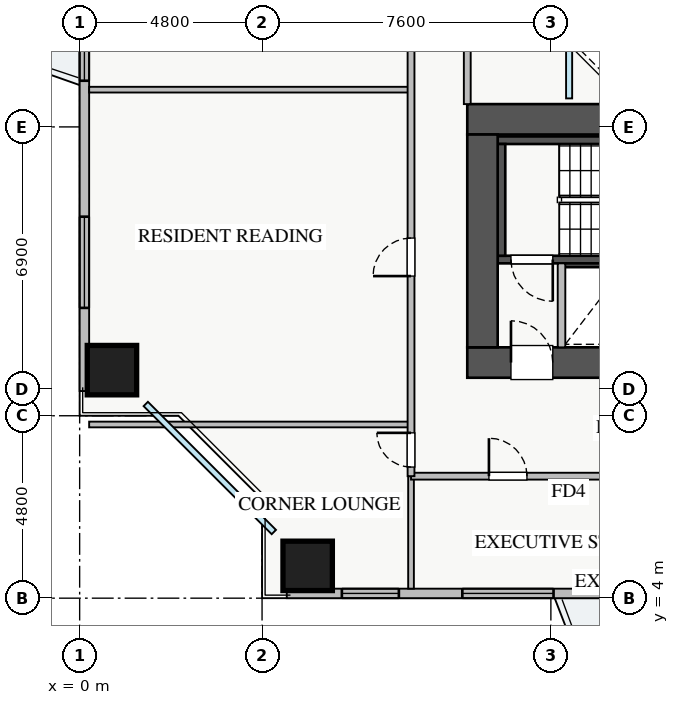
"""IFC4 building model, lengths in metres.
Left out: names, types, materials, properties, quantities, classifications, styles, units other than length and angle.
Written with IfcOpenShell. Run it as: python <this file> out.ifc"""

import sys

from ifc_helpers import new_model, si_unit, direction, frame, frame_2d, origin, origin_2d, place, context, subcontext, project, spatial, rectangle, extrude, source, transform, mapped, element, fill, save


model = new_model("IFC4")
c1 = context("Model", 3, precision=1e-05, world=origin(), true_north=direction((0.0, 1.0)))
c2 = subcontext(c1, "Body", "Model", "MODEL_VIEW")
j1 = project(units=[si_unit("LENGTHUNIT", "METRE"), si_unit("PLANEANGLEUNIT", "RADIAN")], contexts=[c1])
p1 = place(None, origin())
s1 = spatial("IfcSite", under=j1, at=p1, CompositionType="ELEMENT")
p2 = place(p1, origin())
s2 = spatial("IfcBuilding", under=s1, at=p2, CompositionType="ELEMENT")
p3 = place(p2, frame((0.0, 0.0, 42.5)))
s3 = spatial("IfcBuildingStorey", under=s2, at=p3, CompositionType="ELEMENT", Elevation=42.5)
p4 = place(p3, frame((12.68, 12.8, 0.0), z_axis=(0.0, 0.0, 1.0), x_axis=(1.0, 0.0, 0.0)))
e1 = element("IfcWall", 1, at=p4, inside=s3, PredefinedType="SHEAR", context=c2, shape_type="SweptSolid", body=[
    extrude(rectangle(XDim=1.94, YDim=0.18, at=frame_2d((0.97, 0.0))), origin(), (0.0, 0.0, 1.0), 3.03),
])
p5 = place(p3, frame((11.0, 12.91, 0.0), z_axis=(0.0, 0.0, 1.0), x_axis=(1.0, 0.0, 0.0)))
e2 = element("IfcWall", 2, at=p5, inside=s3, PredefinedType="SHEAR", context=c2, shape_type="SweptSolid", body=[
    extrude(rectangle(XDim=7.15, YDim=0.2, at=frame_2d((3.575, 0.0))), origin(), (0.0, 0.0, 1.0), 3.25),
])
p6 = place(p5, frame((0.35, 0.0, 0.0)))
e3 = element("IfcOpeningElement", 3, at=p6, cuts=e2, PredefinedType="OPENING", context=c2, shape_type="SweptSolid", body=[
    extrude(rectangle(XDim=1.1, YDim=2.05, at=frame_2d((0.55, 1.025))), frame((0.0, 0.11, 0.0), z_axis=(0.0, -1.0, 0.0), x_axis=(1.0, 0.0, 0.0)), (0.0, 0.0, 1.0), 0.22),
])
p7 = place(p3, frame((11.0, 16.05, 0.0), z_axis=(0.0, 0.0, 1.0), x_axis=(1.0, 0.0, 0.0)))
e4 = element("IfcWall", 4, at=p7, inside=s3, PredefinedType="SHEAR", context=c2, shape_type="SweptSolid", body=[
    extrude(rectangle(XDim=7.15, YDim=0.2, at=frame_2d((3.575, 0.0))), origin(), (0.0, 0.0, 1.0), 3.25),
])
p8 = place(p3, frame((11.1, 13.01, 0.0), z_axis=(0.0, 0.0, 1.0), x_axis=(0.0, 1.0, 0.0)))
e5 = element("IfcWall", 5, at=p8, inside=s3, PredefinedType="SHEAR", context=c2, shape_type="SweptSolid", body=[
    extrude(rectangle(XDim=2.94, YDim=0.2, at=frame_2d((1.47, 0.0))), origin(), (0.0, 0.0, 1.0), 3.25),
])
p9 = place(p3, frame((10.2, 10.2, 0.0), z_axis=(0.0, 0.0, 1.0), x_axis=(1.0, 0.0, 0.0)))
e6 = element("IfcWall", 6, at=p9, inside=s3, PredefinedType="SHEAR", context=c2, shape_type="SweptSolid", body=[
    extrude(rectangle(XDim=17.6, YDim=0.8, at=frame_2d((8.8, 0.0))), origin(), (0.0, 0.0, 1.0), 3.25),
])
p10 = place(p9, frame((1.15, 0.0, 0.0)))
e7 = element("IfcOpeningElement", 7, at=p10, cuts=e6, PredefinedType="OPENING", context=c2, shape_type="SweptSolid", body=[
    extrude(rectangle(XDim=1.1, YDim=2.05, at=frame_2d((0.55, 1.025))), frame((0.0, 0.41, 0.0), z_axis=(0.0, -1.0, 0.0), x_axis=(1.0, 0.0, 0.0)), (0.0, 0.0, 1.0), 0.82),
])
p11 = place(p9, frame((8.3, 0.0, 0.0)))
e8 = element("IfcOpeningElement", 8, at=p11, cuts=e6, PredefinedType="OPENING", context=c2, shape_type="SweptSolid", body=[
    extrude(rectangle(XDim=1.1, YDim=2.05, at=frame_2d((0.55, 1.025))), frame((0.0, 0.41, 0.0), z_axis=(0.0, -1.0, 0.0), x_axis=(1.0, 0.0, 0.0)), (0.0, 0.0, 1.0), 0.82),
])
p12 = place(p9, frame((10.05, 0.0, 0.0)))
e9 = element("IfcOpeningElement", 9, at=p12, cuts=e6, PredefinedType="OPENING", context=c2, shape_type="SweptSolid", body=[
    extrude(rectangle(XDim=1.1, YDim=2.05, at=frame_2d((0.55, 1.025))), frame((0.0, 0.41, 0.0), z_axis=(0.0, -1.0, 0.0), x_axis=(1.0, 0.0, 0.0)), (0.0, 0.0, 1.0), 0.82),
])
p13 = place(p9, frame((14.74, 0.0, 0.0)))
e10 = element("IfcOpeningElement", 10, at=p13, cuts=e6, PredefinedType="OPENING", context=c2, shape_type="SweptSolid", body=[
    extrude(rectangle(XDim=1.0, YDim=2.05, at=frame_2d((0.5, 1.025))), frame((0.0, 0.41, 0.0), z_axis=(0.0, -1.0, 0.0), x_axis=(1.0, 0.0, 0.0)), (0.0, 0.0, 1.0), 0.82),
])
p14 = place(p9, frame((11.835, 0.0, 0.0)))
e11 = element("IfcOpeningElement", 11, at=p14, cuts=e6, PredefinedType="OPENING", context=c2, shape_type="SweptSolid", body=[
    extrude(rectangle(XDim=1.0, YDim=2.05, at=frame_2d((0.5, 1.025))), frame((0.0, 0.41, 0.0), z_axis=(0.0, -1.0, 0.0), x_axis=(1.0, 0.0, 0.0)), (0.0, 0.0, 1.0), 0.82),
])
p15 = place(p9, frame((13.37, 0.0, 0.0)))
e12 = element("IfcOpeningElement", 12, at=p15, cuts=e6, PredefinedType="OPENING", context=c2, shape_type="SweptSolid", body=[
    extrude(rectangle(XDim=1.0, YDim=2.05, at=frame_2d((0.5, 1.025))), frame((0.0, 0.41, 0.0), z_axis=(0.0, -1.0, 0.0), x_axis=(1.0, 0.0, 0.0)), (0.0, 0.0, 1.0), 0.82),
])
p16 = place(p3, frame((10.2, 16.6, 0.0), z_axis=(0.0, 0.0, 1.0), x_axis=(1.0, 0.0, 0.0)))
e13 = element("IfcWall", 13, at=p16, inside=s3, PredefinedType="SHEAR", context=c2, shape_type="SweptSolid", body=[
    extrude(rectangle(XDim=17.6, YDim=0.8, at=frame_2d((8.8, 0.0))), origin(), (0.0, 0.0, 1.0), 3.25),
])
p17 = place(p3, frame((10.6, 10.6, 0.0), z_axis=(0.0, 0.0, 1.0), x_axis=(0.0, 1.0, 0.0)))
e14 = element("IfcWall", 14, at=p17, inside=s3, PredefinedType="SHEAR", context=c2, shape_type="SweptSolid", body=[
    extrude(rectangle(XDim=5.6, YDim=0.8, at=frame_2d((2.8, 0.0))), origin(), (0.0, 0.0, 1.0), 3.25),
])
m1 = source(origin(), c2, "Body", "SweptSolid", [
    extrude(rectangle(XDim=1.3, YDim=1.3, at=origin_2d()), origin(), (0.0, 0.0, 1.0), 3.25),
])
for number, where, z_axis, x_axis in (
    (15, (6.0, 4.85, 0.0), (0.0, 0.0, 1.0), (1.0, 0.0, 0.0)),
    (16, (0.85, 10.0, 0.0), (0.0, 0.0, 1.0), (1.0, 0.0, 0.0)),
):
    element("IfcColumn", number, at=place(p3, frame(where, z_axis=z_axis, x_axis=x_axis)), inside=s3, PredefinedType="COLUMN", context=c2, shape_type="MappedRepresentation", body=[
        mapped(m1, transform((0.0, 0.0, 0.0), x_axis=(1.0, 0.0, 0.0), y_axis=(0.0, 1.0, 0.0), z_axis=(0.0, 0.0, 1.0), scale=1.0)),
    ])
p18 = place(p3, frame((5.45, 4.125, 0.0), z_axis=(0.0, 0.0, 1.0), x_axis=(1.0, 0.0, 0.0)))
e17 = element("IfcWall", 17, at=p18, inside=s3, PredefinedType="STANDARD", context=c2, shape_type="SweptSolid", body=[
    extrude(rectangle(XDim=27.1, YDim=0.25, at=frame_2d((13.55, 0.0))), origin(), (0.0, 0.0, 1.0), 2.57),
])
p19 = place(p18, frame((14.4, 0.0, 0.0)))
e18 = element("IfcOpeningElement", 18, at=p19, cuts=e17, PredefinedType="OPENING", context=c2, shape_type="SweptSolid", body=[
    extrude(rectangle(XDim=1.2, YDim=2.1, at=frame_2d((0.6, 1.05))), frame((0.0, 0.135, 0.0), z_axis=(0.0, -1.0, 0.0), x_axis=(1.0, 0.0, 0.0)), (0.0, 0.0, 1.0), 0.27),
])
p20 = place(p18, frame((1.45, 0.0, 0.9)))
e19 = element("IfcOpeningElement", 19, at=p20, cuts=e17, PredefinedType="OPENING", context=c2, shape_type="SweptSolid", body=[
    extrude(rectangle(XDim=1.5, YDim=1.5, at=frame_2d((0.75, 0.75))), frame((0.0, 0.135, 0.0), z_axis=(0.0, -1.0, 0.0), x_axis=(1.0, 0.0, 0.0)), (0.0, 0.0, 1.0), 0.27),
])
p21 = place(p18, frame((9.263, 0.0, 0.9)))
e20 = element("IfcOpeningElement", 20, at=p21, cuts=e17, PredefinedType="OPENING", context=c2, shape_type="SweptSolid", body=[
    extrude(rectangle(XDim=1.8, YDim=1.45, at=frame_2d((0.9, 0.725))), frame((0.0, 0.135, 0.0), z_axis=(0.0, -1.0, 0.0), x_axis=(1.0, 0.0, 0.0)), (0.0, 0.0, 1.0), 0.27),
])
p22 = place(p18, frame((17.92, 0.0, 0.9)))
e21 = element("IfcOpeningElement", 21, at=p22, cuts=e17, PredefinedType="OPENING", context=c2, shape_type="SweptSolid", body=[
    extrude(rectangle(XDim=1.5, YDim=1.5, at=frame_2d((0.75, 0.75))), frame((0.0, 0.135, 0.0), z_axis=(0.0, -1.0, 0.0), x_axis=(1.0, 0.0, 0.0)), (0.0, 0.0, 1.0), 0.27),
])
p23 = place(p18, frame((22.663, 0.0, 0.9)))
e22 = element("IfcOpeningElement", 22, at=p23, cuts=e17, PredefinedType="OPENING", context=c2, shape_type="SweptSolid", body=[
    extrude(rectangle(XDim=2.1, YDim=1.48, at=frame_2d((1.05, 0.74))), frame((0.0, 0.135, 0.0), z_axis=(0.0, -1.0, 0.0), x_axis=(1.0, 0.0, 0.0)), (0.0, 0.0, 1.0), 0.27),
])
p24 = place(p18, frame((4.62, 0.0, 0.9)))
e23 = element("IfcOpeningElement", 23, at=p24, cuts=e17, PredefinedType="OPENING", context=c2, shape_type="SweptSolid", body=[
    extrude(rectangle(XDim=2.4, YDim=1.5, at=frame_2d((1.2, 0.75))), frame((0.0, 0.135, 0.0), z_axis=(0.0, -1.0, 0.0), x_axis=(1.0, 0.0, 0.0)), (0.0, 0.0, 1.0), 0.27),
])
p25 = place(p3, frame((0.125, 9.45, 0.0), z_axis=(0.0, 0.0, 1.0), x_axis=(0.0, 1.0, 0.0)))
e24 = element("IfcWall", 24, at=p25, inside=s3, PredefinedType="STANDARD", context=c2, shape_type="SweptSolid", body=[
    extrude(rectangle(XDim=27.1, YDim=0.25, at=frame_2d((13.55, 0.0))), origin(), (0.0, 0.0, 1.0), 2.57),
])
p26 = place(p25, frame((14.4, 0.0, 0.0)))
e25 = element("IfcOpeningElement", 25, at=p26, cuts=e24, PredefinedType="OPENING", context=c2, shape_type="SweptSolid", body=[
    extrude(rectangle(XDim=1.2, YDim=2.1, at=frame_2d((0.6, 1.05))), frame((0.0, 0.135, 0.0), z_axis=(0.0, -1.0, 0.0), x_axis=(1.0, 0.0, 0.0)), (0.0, 0.0, 1.0), 0.27),
])
p27 = place(p25, frame((2.188, 0.0, 0.9)))
e26 = element("IfcOpeningElement", 26, at=p27, cuts=e24, PredefinedType="OPENING", context=c2, shape_type="SweptSolid", body=[
    extrude(rectangle(XDim=2.4, YDim=1.48, at=frame_2d((1.2, 0.74))), frame((0.0, 0.135, 0.0), z_axis=(0.0, -1.0, 0.0), x_axis=(1.0, 0.0, 0.0)), (0.0, 0.0, 1.0), 0.27),
])
p28 = place(p25, frame((23.272, 0.0, 0.9)))
e27 = element("IfcOpeningElement", 27, at=p28, cuts=e24, PredefinedType="OPENING", context=c2, shape_type="SweptSolid", body=[
    extrude(rectangle(XDim=2.1, YDim=1.5, at=frame_2d((1.05, 0.75))), frame((0.0, 0.135, 0.0), z_axis=(0.0, -1.0, 0.0), x_axis=(1.0, 0.0, 0.0)), (0.0, 0.0, 1.0), 0.27),
])
p29 = place(p25, frame((13.05, 0.0, 0.9)))
e28 = element("IfcOpeningElement", 28, at=p29, cuts=e24, PredefinedType="OPENING", context=c2, shape_type="SweptSolid", body=[
    extrude(rectangle(XDim=0.9, YDim=1.2, at=frame_2d((0.45, 0.6))), frame((0.0, 0.135, 0.0), z_axis=(0.0, -1.0, 0.0), x_axis=(1.0, 0.0, 0.0)), (0.0, 0.0, 1.0), 0.27),
])
p30 = place(p25, frame((8.165, 0.0, 0.9)))
e29 = element("IfcOpeningElement", 29, at=p30, cuts=e24, PredefinedType="OPENING", context=c2, shape_type="SweptSolid", body=[
    extrude(rectangle(XDim=0.9, YDim=1.2, at=frame_2d((0.45, 0.6))), frame((0.0, 0.135, 0.0), z_axis=(0.0, -1.0, 0.0), x_axis=(1.0, 0.0, 0.0)), (0.0, 0.0, 1.0), 0.27),
])
p31 = place(p25, frame((18.365, 0.0, 0.9)))
e30 = element("IfcOpeningElement", 30, at=p31, cuts=e24, PredefinedType="OPENING", context=c2, shape_type="SweptSolid", body=[
    extrude(rectangle(XDim=0.9, YDim=1.2, at=frame_2d((0.45, 0.6))), frame((0.0, 0.135, 0.0), z_axis=(0.0, -1.0, 0.0), x_axis=(1.0, 0.0, 0.0)), (0.0, 0.0, 1.0), 0.27),
])
p32 = place(p3, frame((12.68, 10.6, 0.0), z_axis=(0.0, 0.0, 1.0), x_axis=(0.0, 1.0, 0.0)))
e31 = element("IfcWall", 31, at=p32, inside=s3, PredefinedType="PARTITIONING", context=c2, shape_type="SweptSolid", body=[
    extrude(rectangle(XDim=2.21, YDim=0.2, at=frame_2d((1.105, 0.0))), origin(), (0.0, 0.0, 1.0), 3.03),
])
p33 = place(p3, frame((8.72, 4.25, 0.0), z_axis=(0.0, 0.0, 1.0), x_axis=(0.0, 1.0, 0.0)))
e32 = element("IfcWall", 32, at=p33, inside=s3, PredefinedType="PARTITIONING", context=c2, shape_type="SweptSolid", body=[
    extrude(rectangle(XDim=2.96, YDim=0.15, at=frame_2d((1.48, 0.0))), origin(), (0.0, 0.0, 1.0), 3.03),
])
p34 = place(p3, frame((8.72, 7.21, 0.0), z_axis=(0.0, 0.0, 1.0), x_axis=(1.0, 0.0, 0.0)))
e33 = element("IfcWall", 33, at=p34, inside=s3, PredefinedType="PARTITIONING", context=c2, shape_type="SweptSolid", body=[
    extrude(rectangle(XDim=23.63, YDim=0.18, at=frame_2d((11.815, 0.0))), origin(), (0.0, 0.0, 1.0), 3.03),
])
p35 = place(p34, frame((2.05, 0.0, 0.0)))
e34 = element("IfcOpeningElement", 34, at=p35, cuts=e33, PredefinedType="OPENING", context=c2, shape_type="SweptSolid", body=[
    extrude(rectangle(XDim=1.0, YDim=2.05, at=frame_2d((0.5, 1.025))), frame((0.0, 0.1, 0.0), z_axis=(0.0, -1.0, 0.0), x_axis=(1.0, 0.0, 0.0)), (0.0, 0.0, 1.0), 0.2),
])
p36 = place(p34, frame((8.59, 0.0, 0.0)))
e35 = element("IfcOpeningElement", 35, at=p36, cuts=e33, PredefinedType="OPENING", context=c2, shape_type="SweptSolid", body=[
    extrude(rectangle(XDim=1.0, YDim=2.05, at=frame_2d((0.5, 1.025))), frame((0.0, 0.1, 0.0), z_axis=(0.0, -1.0, 0.0), x_axis=(1.0, 0.0, 0.0)), (0.0, 0.0, 1.0), 0.2),
])
p37 = place(p34, frame((14.9, 0.0, 0.0)))
e36 = element("IfcOpeningElement", 36, at=p37, cuts=e33, PredefinedType="OPENING", context=c2, shape_type="SweptSolid", body=[
    extrude(rectangle(XDim=1.0, YDim=2.05, at=frame_2d((0.5, 1.025))), frame((0.0, 0.1, 0.0), z_axis=(0.0, -1.0, 0.0), x_axis=(1.0, 0.0, 0.0)), (0.0, 0.0, 1.0), 0.2),
])
p38 = place(p34, frame((20.175, 0.0, 0.0)))
e37 = element("IfcOpeningElement", 37, at=p38, cuts=e33, PredefinedType="OPENING", context=c2, shape_type="SweptSolid", body=[
    extrude(rectangle(XDim=1.0, YDim=2.05, at=frame_2d((0.5, 1.025))), frame((0.0, 0.1, 0.0), z_axis=(0.0, -1.0, 0.0), x_axis=(1.0, 0.0, 0.0)), (0.0, 0.0, 1.0), 0.2),
])
for number, where, z_axis, x_axis in (
    (38, (0.25, 8.57, 0.0), (0.0, 0.0, 1.0), (1.0, 0.0, 0.0)),
    (39, (0.25, 17.38, 0.0), (0.0, 0.0, 1.0), (1.0, 0.0, 0.0)),
):
    element("IfcWall", number, at=place(p3, frame(where, z_axis=z_axis, x_axis=x_axis)), inside=s3, PredefinedType="PARTITIONING", context=c2, shape_type="SweptSolid", body=[
        extrude(rectangle(XDim=8.47, YDim=0.15, at=frame_2d((4.235, 0.0))), origin(), (0.0, 0.0, 1.0), 3.03),
    ])
p39 = place(p3, frame((8.72, 7.21, 0.0), z_axis=(0.0, 0.0, 1.0), x_axis=(0.0, 1.0, 0.0)))
e40 = element("IfcWall", 40, at=p39, inside=s3, PredefinedType="PARTITIONING", context=c2, shape_type="SweptSolid", body=[
    extrude(rectangle(XDim=31.23, YDim=0.18, at=frame_2d((15.615, 0.0))), origin(), (0.0, 0.0, 1.0), 3.03),
])
p40 = place(p39, frame((30.09, 0.0, 0.0)))
e41 = element("IfcOpeningElement", 41, at=p40, cuts=e40, PredefinedType="OPENING", context=c2, shape_type="SweptSolid", body=[
    extrude(rectangle(XDim=0.9, YDim=2.05, at=frame_2d((0.45, 1.025))), frame((0.0, 0.1, 0.0), z_axis=(0.0, -1.0, 0.0), x_axis=(1.0, 0.0, 0.0)), (0.0, 0.0, 1.0), 0.2),
])
p41 = place(p39, frame((0.24, 0.0, 0.0)))
e42 = element("IfcOpeningElement", 42, at=p41, cuts=e40, PredefinedType="OPENING", context=c2, shape_type="SweptSolid", body=[
    extrude(rectangle(XDim=0.9, YDim=2.05, at=frame_2d((0.45, 1.025))), frame((0.0, 0.1, 0.0), z_axis=(0.0, -1.0, 0.0), x_axis=(1.0, 0.0, 0.0)), (0.0, 0.0, 1.0), 0.2),
])
p42 = place(p39, frame((5.265, 0.0, 0.0)))
e43 = element("IfcOpeningElement", 43, at=p42, cuts=e40, PredefinedType="OPENING", context=c2, shape_type="SweptSolid", body=[
    extrude(rectangle(XDim=1.0, YDim=2.05, at=frame_2d((0.5, 1.025))), frame((0.0, 0.1, 0.0), z_axis=(0.0, -1.0, 0.0), x_axis=(1.0, 0.0, 0.0)), (0.0, 0.0, 1.0), 0.2),
])
p43 = place(p39, frame((11.93, 0.0, 0.0)))
e44 = element("IfcOpeningElement", 44, at=p43, cuts=e40, PredefinedType="OPENING", context=c2, shape_type="SweptSolid", body=[
    extrude(rectangle(XDim=1.0, YDim=2.05, at=frame_2d((0.5, 1.025))), frame((0.0, 0.1, 0.0), z_axis=(0.0, -1.0, 0.0), x_axis=(1.0, 0.0, 0.0)), (0.0, 0.0, 1.0), 0.2),
])
p44 = place(p39, frame((21.96, 0.0, 0.0)))
e45 = element("IfcOpeningElement", 45, at=p44, cuts=e40, PredefinedType="OPENING", context=c2, shape_type="SweptSolid", body=[
    extrude(rectangle(XDim=1.0, YDim=2.05, at=frame_2d((0.5, 1.025))), frame((0.0, 0.1, 0.0), z_axis=(0.0, -1.0, 0.0), x_axis=(1.0, 0.0, 0.0)), (0.0, 0.0, 1.0), 0.2),
])
p45 = place(p3, frame((10.2, 17.0, 0.0), z_axis=(0.0, 0.0, 1.0), x_axis=(0.0, 1.0, 0.0)))
e46 = element("IfcWall", 46, at=p45, inside=s3, PredefinedType="PARTITIONING", context=c2, shape_type="SweptSolid", body=[
    extrude(rectangle(XDim=12.0, YDim=0.18, at=frame_2d((6.0, 0.0))), origin(), (0.0, 0.0, 1.0), 3.03),
])
p46 = place(p45, frame((1.5, 0.0, 0.0)))
e47 = element("IfcOpeningElement", 47, at=p46, cuts=e46, PredefinedType="OPENING", context=c2, shape_type="SweptSolid", body=[
    extrude(rectangle(XDim=0.85, YDim=2.05, at=frame_2d((0.425, 1.025))), frame((0.0, 0.1, 0.0), z_axis=(0.0, -1.0, 0.0), x_axis=(1.0, 0.0, 0.0)), (0.0, 0.0, 1.0), 0.2),
])
p47 = place(p45, frame((6.5, 0.0, 0.0)))
e48 = element("IfcOpeningElement", 48, at=p47, cuts=e46, PredefinedType="OPENING", context=c2, shape_type="SweptSolid", body=[
    extrude(rectangle(XDim=1.0, YDim=2.05, at=frame_2d((0.5, 1.025))), frame((0.0, 0.1, 0.0), z_axis=(0.0, -1.0, 0.0), x_axis=(1.0, 0.0, 0.0)), (0.0, 0.0, 1.0), 0.2),
])
m2 = source(origin(), c2, "Body", "SweptSolid", [
    extrude(rectangle(XDim=1.5, YDim=1.5, at=frame_2d((0.75, 0.75))), frame((0.0, 0.03, 0.0), z_axis=(0.0, -1.0, 0.0), x_axis=(1.0, 0.0, 0.0)), (0.0, 0.0, 1.0), 0.06),
])
p48 = place(p20, origin())
e49 = element("IfcWindow", 49, at=p48, inside=s3, PartitioningType="TRIPLE_PANEL_VERTICAL", PredefinedType="WINDOW", context=c2, shape_type="MappedRepresentation", body=[
    mapped(m2, transform((0.0, 0.0, 0.0), x_axis=(1.0, 0.0, 0.0), y_axis=(0.0, 1.0, 0.0), z_axis=(0.0, 0.0, 1.0), scale=1.0)),
])
fill(e19, e49)
m3 = source(origin(), c2, "Body", "SweptSolid", [
    extrude(rectangle(XDim=2.4, YDim=1.48, at=frame_2d((1.2, 0.74))), frame((0.0, 0.03, 0.0), z_axis=(0.0, -1.0, 0.0), x_axis=(1.0, 0.0, 0.0)), (0.0, 0.0, 1.0), 0.06),
])
p49 = place(p27, origin())
e50 = element("IfcWindow", 50, at=p49, inside=s3, PartitioningType="TRIPLE_PANEL_VERTICAL", PredefinedType="WINDOW", context=c2, shape_type="MappedRepresentation", body=[
    mapped(m3, transform((0.0, 0.0, 0.0), x_axis=(1.0, 0.0, 0.0), y_axis=(0.0, 1.0, 0.0), z_axis=(0.0, 0.0, 1.0), scale=1.0)),
])
fill(e26, e50)
m4 = source(origin(), c2, "Body", "SweptSolid", [
    extrude(rectangle(XDim=1.1, YDim=2.05, at=frame_2d((0.55, 1.025))), frame((0.0, 0.025, 0.0), z_axis=(0.0, -1.0, 0.0), x_axis=(1.0, 0.0, 0.0)), (0.0, 0.0, 1.0), 0.05),
])
p50 = place(p10, origin())
e51 = element("IfcDoor", 51, at=p50, inside=s3, OperationType="SINGLE_SWING_LEFT", PredefinedType="DOOR", context=c2, shape_type="MappedRepresentation", body=[
    mapped(m4, transform((0.0, 0.0, 0.0), x_axis=(1.0, 0.0, 0.0), y_axis=(0.0, 1.0, 0.0), z_axis=(0.0, 0.0, 1.0), scale=1.0)),
])
fill(e7, e51)
p51 = place(p6, frame((1.1, 0.0, 0.0), z_axis=(0.0, 0.0, 1.0), x_axis=(-1.0, 0.0, 0.0)))
e52 = element("IfcDoor", 52, at=p51, inside=s3, OperationType="SINGLE_SWING_RIGHT", PredefinedType="DOOR", context=c2, shape_type="MappedRepresentation", body=[
    mapped(m4, transform((0.0, 0.0, 0.0), x_axis=(1.0, 0.0, 0.0), y_axis=(0.0, 1.0, 0.0), z_axis=(0.0, 0.0, 1.0), scale=1.0)),
])
fill(e3, e52)
m5 = source(origin(), c2, "Body", "SweptSolid", [
    extrude(rectangle(XDim=1.0, YDim=2.05, at=frame_2d((0.5, 1.025))), frame((0.0, 0.025, 0.0), z_axis=(0.0, -1.0, 0.0), x_axis=(1.0, 0.0, 0.0)), (0.0, 0.0, 1.0), 0.05),
])
p52 = place(p35, origin())
e53 = element("IfcDoor", 53, at=p52, inside=s3, OperationType="SINGLE_SWING_LEFT", PredefinedType="DOOR", context=c2, shape_type="MappedRepresentation", body=[
    mapped(m5, transform((0.0, 0.0, 0.0), x_axis=(1.0, 0.0, 0.0), y_axis=(0.0, 1.0, 0.0), z_axis=(0.0, 0.0, 1.0), scale=1.0)),
])
fill(e34, e53)
m6 = source(origin(), c2, "Body", "SweptSolid", [
    extrude(rectangle(XDim=0.9, YDim=2.05, at=frame_2d((0.45, 1.025))), frame((0.0, 0.025, 0.0), z_axis=(0.0, -1.0, 0.0), x_axis=(1.0, 0.0, 0.0)), (0.0, 0.0, 1.0), 0.05),
])
p53 = place(p41, origin())
e54 = element("IfcDoor", 54, at=p53, inside=s3, OperationType="SINGLE_SWING_RIGHT", PredefinedType="DOOR", context=c2, shape_type="MappedRepresentation", body=[
    mapped(m6, transform((0.0, 0.0, 0.0), x_axis=(1.0, 0.0, 0.0), y_axis=(0.0, 1.0, 0.0), z_axis=(0.0, 0.0, 1.0), scale=1.0)),
])
fill(e42, e54)
p54 = place(p42, origin())
e55 = element("IfcDoor", 55, at=p54, inside=s3, OperationType="SINGLE_SWING_LEFT", PredefinedType="DOOR", context=c2, shape_type="MappedRepresentation", body=[
    mapped(m5, transform((0.0, 0.0, 0.0), x_axis=(1.0, 0.0, 0.0), y_axis=(0.0, 1.0, 0.0), z_axis=(0.0, 0.0, 1.0), scale=1.0)),
])
fill(e43, e55)
m7 = source(origin(), c2, "Body", "SweptSolid", [
    extrude(rectangle(XDim=2.4, YDim=1.5, at=frame_2d((1.2, 0.75))), frame((0.0, 0.03, 0.0), z_axis=(0.0, -1.0, 0.0), x_axis=(1.0, 0.0, 0.0)), (0.0, 0.0, 1.0), 0.06),
])
p55 = place(p24, origin())
e56 = element("IfcWindow", 56, at=p55, inside=s3, PartitioningType="TRIPLE_PANEL_VERTICAL", PredefinedType="WINDOW", context=c2, shape_type="MappedRepresentation", body=[
    mapped(m7, transform((0.0, 0.0, 0.0), x_axis=(1.0, 0.0, 0.0), y_axis=(0.0, 1.0, 0.0), z_axis=(0.0, 0.0, 1.0), scale=1.0)),
])
fill(e23, e56)
m8 = source(origin(), c2, "Body", "SweptSolid", [
    extrude(rectangle(XDim=0.9, YDim=1.2, at=frame_2d((0.45, 0.6))), frame((0.0, 0.03, 0.0), z_axis=(0.0, -1.0, 0.0), x_axis=(1.0, 0.0, 0.0)), (0.0, 0.0, 1.0), 0.06),
])
p56 = place(p30, origin())
e57 = element("IfcWindow", 57, at=p56, inside=s3, PartitioningType="SINGLE_PANEL", PredefinedType="WINDOW", context=c2, shape_type="MappedRepresentation", body=[
    mapped(m8, transform((0.0, 0.0, 0.0), x_axis=(1.0, 0.0, 0.0), y_axis=(0.0, 1.0, 0.0), z_axis=(0.0, 0.0, 1.0), scale=1.0)),
])
fill(e29, e57)
save(model, sys.argv[1])
